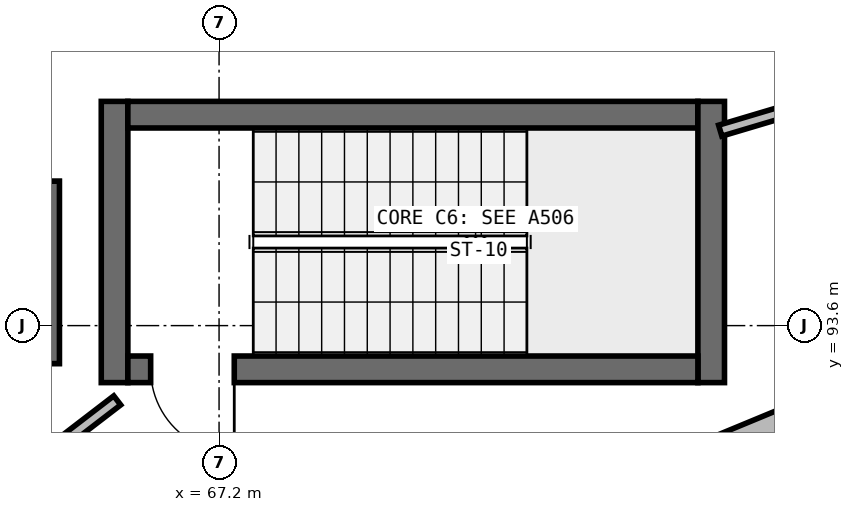
"""IFC4 building model, lengths in metres.
Left out: names, types, materials, properties, quantities, classifications, styles, units other than length and angle.
Written with IfcOpenShell. Run it as: python <this file> out.ifc"""

import sys

from ifc_helpers import new_model, si_unit, direction, frame, frame_2d, origin, place, context, subcontext, project, spatial, rectangle, extrude, element, fill, save


model = new_model("IFC4")
c1 = context("Model", 3, precision=1e-05, world=origin(), true_north=direction((0.0, 1.0)))
c2 = subcontext(c1, "Body", "Model", "MODEL_VIEW")
j1 = project(units=[si_unit("LENGTHUNIT", "METRE"), si_unit("PLANEANGLEUNIT", "RADIAN")], contexts=[c1])
p1 = place(None, origin())
s1 = spatial("IfcSite", under=j1, at=p1, CompositionType="ELEMENT")
p2 = place(p1, origin())
s2 = spatial("IfcBuilding", under=s1, at=p2, CompositionType="ELEMENT")
p3 = place(p2, frame((0.0, 0.0, 5.25)))
s3 = spatial("IfcBuildingStorey", under=s2, at=p3, CompositionType="ELEMENT", Elevation=5.25)
p4 = place(p3, frame((65.825, 92.85, 0.0), z_axis=(0.0, 0.0, 1.0), x_axis=(0.0, 1.0, 0.0)))
e1 = element("IfcWall", 1, at=p4, inside=s3, PredefinedType="SHEAR", context=c2, shape_type="SweptSolid", body=[
    extrude(rectangle(XDim=3.7, YDim=0.35, at=frame_2d((1.85, 0.0))), origin(), (0.0, 0.0, 1.0), 4.55),
])
p5 = place(p3, frame((66.0, 96.375, 0.0), z_axis=(0.0, 0.0, 1.0), x_axis=(1.0, 0.0, 0.0)))
e2 = element("IfcWall", 2, at=p5, inside=s3, PredefinedType="SHEAR", context=c2, shape_type="SweptSolid", body=[
    extrude(rectangle(XDim=7.5, YDim=0.35, at=frame_2d((3.75, 0.0))), origin(), (0.0, 0.0, 1.0), 4.55),
])
p6 = place(p3, frame((73.675, 96.55, 0.0), z_axis=(0.0, 0.0, 1.0), x_axis=(0.0, -1.0, 0.0)))
e3 = element("IfcWall", 3, at=p6, inside=s3, PredefinedType="SHEAR", context=c2, shape_type="SweptSolid", body=[
    extrude(rectangle(XDim=3.7, YDim=0.35, at=frame_2d((1.85, 0.0))), origin(), (0.0, 0.0, 1.0), 4.55),
])
p7 = place(p3, frame((73.5, 93.025, 0.0), z_axis=(0.0, 0.0, 1.0), x_axis=(-1.0, 0.0, 0.0)))
e4 = element("IfcWall", 4, at=p7, inside=s3, PredefinedType="SHEAR", context=c2, shape_type="SweptSolid", body=[
    extrude(rectangle(XDim=7.5, YDim=0.35, at=frame_2d((3.75, 0.0))), origin(), (0.0, 0.0, 1.0), 4.55),
])
p8 = place(p7, frame((6.1, 0.0, 0.0)))
e5 = element("IfcOpeningElement", 5, at=p8, cuts=e4, PredefinedType="OPENING", context=c2, shape_type="SweptSolid", body=[
    extrude(rectangle(XDim=1.1, YDim=2.15, at=frame_2d((0.55, 1.075))), frame((0.0, 0.185, 0.0), z_axis=(0.0, -1.0, 0.0), x_axis=(1.0, 0.0, 0.0)), (0.0, 0.0, 1.0), 0.37),
])
p9 = place(p3, frame((64.95, 95.5, 0.0), z_axis=(0.0, 0.0, 1.0), x_axis=(0.0, -1.0, 0.0)))
e6 = element("IfcWall", 6, at=p9, inside=s3, PredefinedType="SHEAR", context=c2, shape_type="SweptSolid", body=[
    extrude(rectangle(XDim=2.4, YDim=0.3, at=frame_2d((1.2, 0.0))), origin(), (0.0, 0.0, 1.0), 4.37),
])
p10 = place(p3, frame((76.988, 93.341, 0.0), z_axis=(0.0, 0.0, 1.0), x_axis=(-0.92385889973, -0.382733240508, 0.0)))
e7 = element("IfcWall", 7, at=p10, inside=s3, PredefinedType="SOLIDWALL", context=c2, shape_type="SweptSolid", body=[
    extrude(rectangle(XDim=10.081, YDim=0.29, at=frame_2d((5.04, 0.0))), origin(), (0.0, 0.0, 1.0), 4.37),
])
p11 = place(p10, frame((4.405, 0.0, 0.95)))
e8 = element("IfcOpeningElement", 8, at=p11, cuts=e7, PredefinedType="OPENING", context=c2, shape_type="SweptSolid", body=[
    extrude(rectangle(XDim=1.27, YDim=1.43, at=frame_2d((0.635, 0.715))), frame((0.0, 0.155, 0.0), z_axis=(0.0, -1.0, 0.0), x_axis=(1.0, 0.0, 0.0)), (0.0, 0.0, 1.0), 0.31),
])
p12 = place(p3, frame((76.057, 96.839, 0.0), z_axis=(0.0, 0.0, 1.0), x_axis=(-0.95838508169, -0.285478607244, 0.0)))
e9 = element("IfcWall", 9, at=p12, inside=s3, PredefinedType="PARTITIONING", context=c2, shape_type="SweptSolid", body=[
    extrude(rectangle(XDim=2.361, YDim=0.15, at=frame_2d((1.181, 0.0))), origin(), (0.0, 0.0, 1.0), 3.737),
])
p13 = place(p3, frame((65.86, 92.616, 0.0), z_axis=(0.0, 0.0, 1.0), x_axis=(-0.793301872689, -0.608828497024, 0.0)))
e10 = element("IfcWall", 10, at=p13, inside=s3, PredefinedType="PARTITIONING", context=c2, shape_type="SweptSolid", body=[
    extrude(rectangle(XDim=11.038, YDim=0.15, at=frame_2d((5.519, 0.0))), origin(), (0.0, 0.0, 1.0), 3.737),
])
p14 = place(p13, frame((4.95, 0.0, 0.0)))
e11 = element("IfcOpeningElement", 11, at=p14, cuts=e10, PredefinedType="OPENING", context=c2, shape_type="SweptSolid", body=[
    extrude(rectangle(XDim=1.1, YDim=2.2, at=frame_2d((0.55, 1.1))), frame((0.0, 0.085, 0.0), z_axis=(0.0, -1.0, 0.0), x_axis=(1.0, 0.0, 0.0)), (0.0, 0.0, 1.0), 0.17),
])
p15 = place(p3, frame((76.057, 96.839, 0.0), z_axis=(0.0, 0.0, 1.0), x_axis=(-0.258832719409, 0.965922162166, 0.0)))
e12 = element("IfcWall", 12, at=p15, inside=s3, PredefinedType="PARTITIONING", context=c2, shape_type="SweptSolid", body=[
    extrude(rectangle(XDim=6.44, YDim=0.15, at=frame_2d((3.22, 0.0))), origin(), (0.0, 0.0, 1.0), 3.737),
])
p16 = place(p8, origin())
e13 = element("IfcDoor", 13, at=p16, inside=s3, OperationType="SINGLE_SWING_LEFT", PredefinedType="DOOR", context=c2, shape_type="SweptSolid", body=[
    extrude(rectangle(XDim=1.1, YDim=2.15, at=frame_2d((0.55, 1.075))), frame((0.0, 0.025, 0.0), z_axis=(0.0, -1.0, 0.0), x_axis=(1.0, 0.0, 0.0)), (0.0, 0.0, 1.0), 0.05),
])
fill(e5, e13)
save(model, sys.argv[1])
